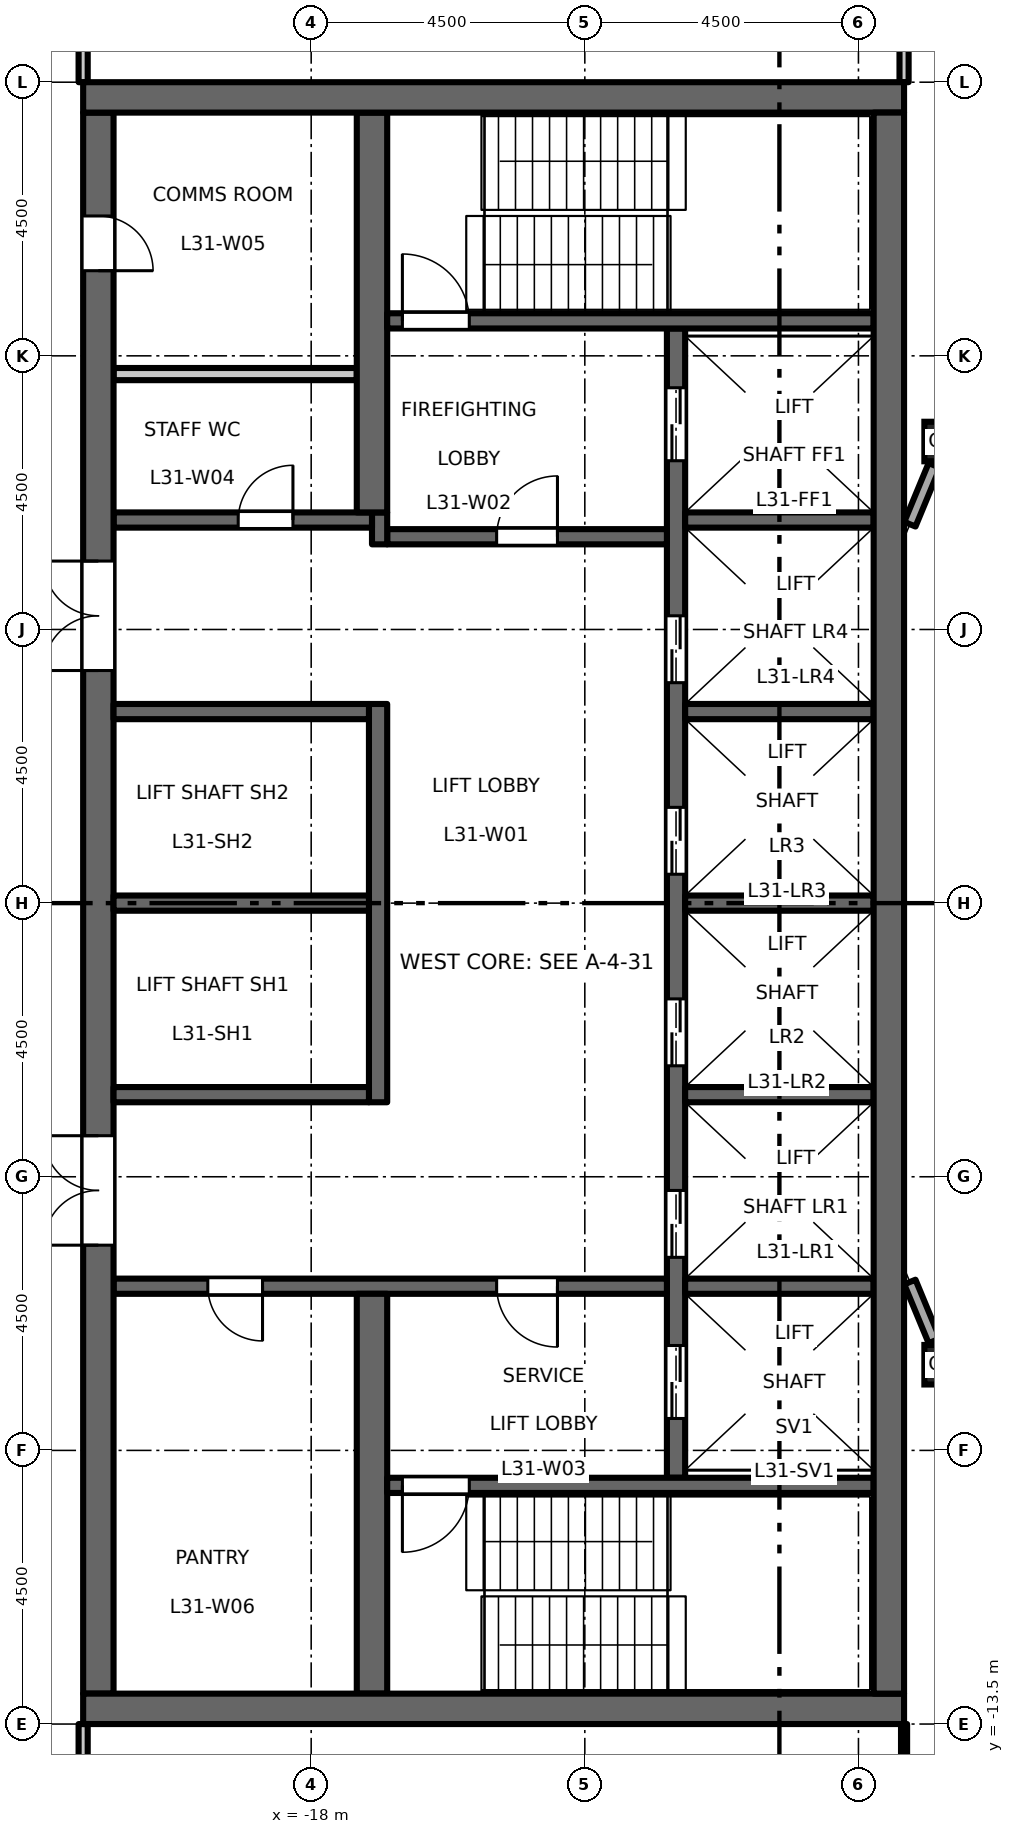
"""IFC4 building model, lengths in metres.
Left out: names, types, materials, properties, quantities, classifications, styles, units other than length and angle.
Written with IfcOpenShell. Run it as: python <this file> out.ifc"""

import sys

from ifc_helpers import new_model, si_unit, direction, frame, frame_2d, origin, origin_2d, place, context, subcontext, project, spatial, rectangle, hollow_rectangle, extrude, element, fill, save


model = new_model("IFC4")
c1 = context("Model", 3, precision=1e-05, world=origin(), true_north=direction((0.0, 1.0)))
c2 = subcontext(c1, "Body", "Model", "MODEL_VIEW")
j1 = project(units=[si_unit("LENGTHUNIT", "METRE"), si_unit("PLANEANGLEUNIT", "RADIAN")], contexts=[c1])
p1 = place(None, origin())
s1 = spatial("IfcSite", under=j1, at=p1, CompositionType="ELEMENT")
p2 = place(p1, origin())
s2 = spatial("IfcBuilding", under=s1, at=p2, CompositionType="ELEMENT")
p3 = place(p2, frame((0.0, 0.0, 145.2)))
s3 = spatial("IfcBuildingStorey", under=s2, at=p3, CompositionType="ELEMENT", Elevation=145.2)
for number, where, z_axis, x_axis in (
    (1, (-7.591, -7.591, 0.0), (0.0, 0.0, 1.0), (1.0, 0.0, 0.0)),
    (2, (-7.591, 7.591, 0.0), (0.0, 0.0, 1.0), (1.0, 0.0, 0.0)),
):
    element("IfcColumn", number, at=place(p3, frame(where, z_axis=z_axis, x_axis=x_axis)), inside=s3, PredefinedType="COLUMN", context=c2, shape_type="SweptSolid", body=[
        extrude(hollow_rectangle(XDim=0.65, YDim=0.65, WallThickness=0.036, at=origin_2d()), origin(), (0.0, 0.0, 1.0), 4.5),
    ])
p4 = place(p3, frame((-12.0, -9.45, 0.0), z_axis=(0.0, 0.0, 1.0), x_axis=(0.0, 1.0, 0.0)))
e3 = element("IfcWall", 3, at=p4, inside=s3, PredefinedType="SHEAR", context=c2, shape_type="SweptSolid", body=[
    extrude(rectangle(XDim=18.9, YDim=0.3, at=frame_2d((9.45, 0.0))), origin(), (0.0, 0.0, 1.0), 4.35),
])
p5 = place(p4, frame((3.625, 0.0, 0.0)))
e4 = element("IfcOpeningElement", 4, at=p5, cuts=e3, PredefinedType="OPENING", context=c2, shape_type="SweptSolid", body=[
    extrude(rectangle(XDim=1.1, YDim=2.1, at=frame_2d((0.55, 1.05))), frame((0.0, 0.16, 0.0), z_axis=(0.0, -1.0, 0.0), x_axis=(1.0, 0.0, 0.0)), (0.0, 0.0, 1.0), 0.32),
])
p6 = place(p4, frame((6.775, 0.0, 0.0)))
e5 = element("IfcOpeningElement", 5, at=p6, cuts=e3, PredefinedType="OPENING", context=c2, shape_type="SweptSolid", body=[
    extrude(rectangle(XDim=1.1, YDim=2.1, at=frame_2d((0.55, 1.05))), frame((0.0, 0.16, 0.0), z_axis=(0.0, -1.0, 0.0), x_axis=(1.0, 0.0, 0.0)), (0.0, 0.0, 1.0), 0.32),
])
p7 = place(p4, frame((9.925, 0.0, 0.0)))
e6 = element("IfcOpeningElement", 6, at=p7, cuts=e3, PredefinedType="OPENING", context=c2, shape_type="SweptSolid", body=[
    extrude(rectangle(XDim=1.1, YDim=2.1, at=frame_2d((0.55, 1.05))), frame((0.0, 0.16, 0.0), z_axis=(0.0, -1.0, 0.0), x_axis=(1.0, 0.0, 0.0)), (0.0, 0.0, 1.0), 0.32),
])
p8 = place(p4, frame((13.075, 0.0, 0.0)))
e7 = element("IfcOpeningElement", 7, at=p8, cuts=e3, PredefinedType="OPENING", context=c2, shape_type="SweptSolid", body=[
    extrude(rectangle(XDim=1.1, YDim=2.1, at=frame_2d((0.55, 1.05))), frame((0.0, 0.16, 0.0), z_axis=(0.0, -1.0, 0.0), x_axis=(1.0, 0.0, 0.0)), (0.0, 0.0, 1.0), 0.32),
])
p9 = place(p4, frame((16.725, 0.0, 0.0)))
e8 = element("IfcOpeningElement", 8, at=p9, cuts=e3, PredefinedType="OPENING", context=c2, shape_type="SweptSolid", body=[
    extrude(rectangle(XDim=1.2, YDim=2.1, at=frame_2d((0.6, 1.05))), frame((0.0, 0.16, 0.0), z_axis=(0.0, -1.0, 0.0), x_axis=(1.0, 0.0, 0.0)), (0.0, 0.0, 1.0), 0.32),
])
p10 = place(p4, frame((0.975, 0.0, 0.0)))
e9 = element("IfcOpeningElement", 9, at=p10, cuts=e3, PredefinedType="OPENING", context=c2, shape_type="SweptSolid", body=[
    extrude(rectangle(XDim=1.2, YDim=2.1, at=frame_2d((0.6, 1.05))), frame((0.0, 0.16, 0.0), z_axis=(0.0, -1.0, 0.0), x_axis=(1.0, 0.0, 0.0)), (0.0, 0.0, 1.0), 0.32),
])
p11 = place(p3, frame((-12.15, 6.025, 0.0), z_axis=(0.0, 0.0, 1.0), x_axis=(-1.0, 0.0, 0.0)))
e10 = element("IfcWall", 10, at=p11, inside=s3, PredefinedType="SHEAR", context=c2, shape_type="SweptSolid", body=[
    extrude(rectangle(XDim=4.6, YDim=0.25, at=frame_2d((2.3, 0.0))), origin(), (0.0, 0.0, 1.0), 4.35),
])
p12 = place(p11, frame((1.8, 0.0, 0.0)))
e11 = element("IfcOpeningElement", 11, at=p12, cuts=e10, PredefinedType="OPENING", context=c2, shape_type="SweptSolid", body=[
    extrude(rectangle(XDim=1.0, YDim=2.1, at=frame_2d((0.5, 1.05))), frame((0.0, 0.135, 0.0), z_axis=(0.0, -1.0, 0.0), x_axis=(1.0, 0.0, 0.0)), (0.0, 0.0, 1.0), 0.27),
])
p13 = place(p3, frame((-16.875, 5.9, 0.0), z_axis=(0.0, 0.0, 1.0), x_axis=(0.0, 1.0, 0.0)))
e12 = element("IfcWall", 12, at=p13, inside=s3, PredefinedType="SHEAR", context=c2, shape_type="SweptSolid", body=[
    extrude(rectangle(XDim=0.525, YDim=0.25, at=frame_2d((0.263, 0.0))), origin(), (0.0, 0.0, 1.0), 4.35),
])
p14 = place(p3, frame((-17.0, 6.3, 0.0), z_axis=(0.0, 0.0, 1.0), x_axis=(-1.0, 0.0, 0.0)))
e13 = element("IfcWall", 13, at=p14, inside=s3, PredefinedType="SHEAR", context=c2, shape_type="SweptSolid", body=[
    extrude(rectangle(XDim=4.25, YDim=0.25, at=frame_2d((2.125, 0.0))), origin(), (0.0, 0.0, 1.0), 4.35),
])
p15 = place(p14, frame((1.3, 0.0, 0.0)))
e14 = element("IfcOpeningElement", 14, at=p15, cuts=e13, PredefinedType="OPENING", context=c2, shape_type="SweptSolid", body=[
    extrude(rectangle(XDim=0.9, YDim=2.1, at=frame_2d((0.45, 1.05))), frame((0.0, 0.135, 0.0), z_axis=(0.0, -1.0, 0.0), x_axis=(1.0, 0.0, 0.0)), (0.0, 0.0, 1.0), 0.27),
])
p16 = place(p3, frame((-12.15, -6.3, 0.0), z_axis=(0.0, 0.0, 1.0), x_axis=(-1.0, 0.0, 0.0)))
e15 = element("IfcWall", 15, at=p16, inside=s3, PredefinedType="SHEAR", context=c2, shape_type="SweptSolid", body=[
    extrude(rectangle(XDim=9.1, YDim=0.25, at=frame_2d((4.55, 0.0))), origin(), (0.0, 0.0, 1.0), 4.35),
])
p17 = place(p16, frame((1.8, 0.0, 0.0)))
e16 = element("IfcOpeningElement", 16, at=p17, cuts=e15, PredefinedType="OPENING", context=c2, shape_type="SweptSolid", body=[
    extrude(rectangle(XDim=1.0, YDim=2.1, at=frame_2d((0.5, 1.05))), frame((0.0, 0.135, 0.0), z_axis=(0.0, -1.0, 0.0), x_axis=(1.0, 0.0, 0.0)), (0.0, 0.0, 1.0), 0.27),
])
p18 = place(p16, frame((6.65, 0.0, 0.0)))
e17 = element("IfcOpeningElement", 17, at=p18, cuts=e15, PredefinedType="OPENING", context=c2, shape_type="SweptSolid", body=[
    extrude(rectangle(XDim=0.9, YDim=2.1, at=frame_2d((0.45, 1.05))), frame((0.0, 0.135, 0.0), z_axis=(0.0, -1.0, 0.0), x_axis=(1.0, 0.0, 0.0)), (0.0, 0.0, 1.0), 0.27),
])
p19 = place(p3, frame((-21.5, -13.0, 0.0), z_axis=(0.0, 0.0, 1.0), x_axis=(0.0, 1.0, 0.0)))
e18 = element("IfcWall", 18, at=p19, inside=s3, PredefinedType="SHEAR", context=c2, shape_type="SweptSolid", body=[
    extrude(rectangle(XDim=26.0, YDim=0.5, at=frame_2d((13.0, 0.0))), origin(), (0.0, 0.0, 1.0), 4.35),
])
p20 = place(p19, frame((16.825, 0.0, 0.0)))
e19 = element("IfcOpeningElement", 19, at=p20, cuts=e18, PredefinedType="OPENING", context=c2, shape_type="SweptSolid", body=[
    extrude(rectangle(XDim=1.8, YDim=2.1, at=frame_2d((0.9, 1.05))), frame((0.0, 0.26, 0.0), z_axis=(0.0, -1.0, 0.0), x_axis=(1.0, 0.0, 0.0)), (0.0, 0.0, 1.0), 0.52),
])
p21 = place(p19, frame((7.375, 0.0, 0.0)))
e20 = element("IfcOpeningElement", 20, at=p21, cuts=e18, PredefinedType="OPENING", context=c2, shape_type="SweptSolid", body=[
    extrude(rectangle(XDim=1.8, YDim=2.1, at=frame_2d((0.9, 1.05))), frame((0.0, 0.26, 0.0), z_axis=(0.0, -1.0, 0.0), x_axis=(1.0, 0.0, 0.0)), (0.0, 0.0, 1.0), 0.52),
])
p22 = place(p19, frame((23.4, 0.0, 0.0)))
e21 = element("IfcOpeningElement", 21, at=p22, cuts=e18, PredefinedType="OPENING", context=c2, shape_type="SweptSolid", body=[
    extrude(rectangle(XDim=0.9, YDim=2.1, at=frame_2d((0.45, 1.05))), frame((0.0, 0.26, 0.0), z_axis=(0.0, -1.0, 0.0), x_axis=(1.0, 0.0, 0.0)), (0.0, 0.0, 1.0), 0.52),
])
p23 = place(p3, frame((-17.25, 8.7, 0.0), z_axis=(0.0, 0.0, 1.0), x_axis=(-1.0, 0.0, 0.0)))
e22 = element("IfcWall", 22, at=p23, inside=s3, PredefinedType="PARTITIONING", context=c2, shape_type="SweptSolid", body=[
    extrude(rectangle(XDim=4.0, YDim=0.2, at=frame_2d((2.0, 0.0))), origin(), (0.0, 0.0, 1.0), 4.35),
])
p24 = place(p3, frame((-16.9, -3.275, 0.0), z_axis=(0.0, 0.0, 1.0), x_axis=(0.0, 1.0, 0.0)))
e23 = element("IfcWall", 23, at=p24, inside=s3, PredefinedType="SHEAR", context=c2, shape_type="SweptSolid", body=[
    extrude(rectangle(XDim=6.55, YDim=0.3, at=frame_2d((3.275, 0.0))), origin(), (0.0, 0.0, 1.0), 4.35),
])
for number, where, z_axis, x_axis in (
    (24, (-17.05, 0.0, 0.0), (0.0, 0.0, 1.0), (-1.0, 0.0, 0.0)),
    (25, (-17.05, 3.15, 0.0), (0.0, 0.0, 1.0), (-1.0, 0.0, 0.0)),
    (26, (-17.05, -3.15, 0.0), (0.0, 0.0, 1.0), (-1.0, 0.0, 0.0)),
):
    element("IfcWall", number, at=place(p3, frame(where, z_axis=z_axis, x_axis=x_axis)), inside=s3, PredefinedType="SHEAR", context=c2, shape_type="SweptSolid", body=[
        extrude(rectangle(XDim=4.2, YDim=0.25, at=frame_2d((2.1, 0.0))), origin(), (0.0, 0.0, 1.0), 4.35),
    ])
for number, where, z_axis, x_axis in (
    (27, (-17.0, 6.425, 0.0), (0.0, 0.0, 1.0), (0.0, 1.0, 0.0)),
    (28, (-17.0, -13.0, 0.0), (0.0, 0.0, 1.0), (0.0, 1.0, 0.0)),
):
    element("IfcWall", number, at=place(p3, frame(where, z_axis=z_axis, x_axis=x_axis)), inside=s3, PredefinedType="SHEAR", context=c2, shape_type="SweptSolid", body=[
        extrude(rectangle(XDim=6.575, YDim=0.5, at=frame_2d((3.288, 0.0))), origin(), (0.0, 0.0, 1.0), 4.35),
    ])
for number, where, z_axis, x_axis in (
    (29, (-8.75, 0.0, 0.0), (0.0, 0.0, 1.0), (-1.0, 0.0, 0.0)),
    (30, (-8.75, 3.15, 0.0), (0.0, 0.0, 1.0), (-1.0, 0.0, 0.0)),
    (31, (-8.75, 6.3, 0.0), (0.0, 0.0, 1.0), (-1.0, 0.0, 0.0)),
    (32, (-8.75, -3.15, 0.0), (0.0, 0.0, 1.0), (-1.0, 0.0, 0.0)),
    (33, (-8.75, -6.3, 0.0), (0.0, 0.0, 1.0), (-1.0, 0.0, 0.0)),
):
    element("IfcWall", number, at=place(p3, frame(where, z_axis=z_axis, x_axis=x_axis)), inside=s3, PredefinedType="SHEAR", context=c2, shape_type="SweptSolid", body=[
        extrude(rectangle(XDim=3.1, YDim=0.25, at=frame_2d((1.55, 0.0))), origin(), (0.0, 0.0, 1.0), 4.35),
    ])
p25 = place(p3, frame((-8.75, 9.575, 0.0), z_axis=(0.0, 0.0, 1.0), x_axis=(-1.0, 0.0, 0.0)))
e34 = element("IfcWall", 34, at=p25, inside=s3, PredefinedType="SHEAR", context=c2, shape_type="SweptSolid", body=[
    extrude(rectangle(XDim=8.0, YDim=0.25, at=frame_2d((4.0, 0.0))), origin(), (0.0, 0.0, 1.0), 4.35),
])
p26 = place(p25, frame((6.65, 0.0, 0.0)))
e35 = element("IfcOpeningElement", 35, at=p26, cuts=e34, PredefinedType="OPENING", context=c2, shape_type="SweptSolid", body=[
    extrude(rectangle(XDim=1.1, YDim=2.1, at=frame_2d((0.55, 1.05))), frame((0.0, 0.135, 0.0), z_axis=(0.0, -1.0, 0.0), x_axis=(1.0, 0.0, 0.0)), (0.0, 0.0, 1.0), 0.27),
])
p27 = place(p3, frame((-8.75, -9.575, 0.0), z_axis=(0.0, 0.0, 1.0), x_axis=(-1.0, 0.0, 0.0)))
e36 = element("IfcWall", 36, at=p27, inside=s3, PredefinedType="SHEAR", context=c2, shape_type="SweptSolid", body=[
    extrude(rectangle(XDim=8.0, YDim=0.25, at=frame_2d((4.0, 0.0))), origin(), (0.0, 0.0, 1.0), 4.35),
])
p28 = place(p27, frame((6.65, 0.0, 0.0)))
e37 = element("IfcOpeningElement", 37, at=p28, cuts=e36, PredefinedType="OPENING", context=c2, shape_type="SweptSolid", body=[
    extrude(rectangle(XDim=1.1, YDim=2.1, at=frame_2d((0.55, 1.05))), frame((0.0, 0.135, 0.0), z_axis=(0.0, -1.0, 0.0), x_axis=(1.0, 0.0, 0.0)), (0.0, 0.0, 1.0), 0.27),
])
for number, where, z_axis, x_axis in (
    (38, (-8.25, 13.25, 0.0), (0.0, 0.0, 1.0), (-1.0, 0.0, 0.0)),
    (39, (-8.25, -13.25, 0.0), (0.0, 0.0, 1.0), (-1.0, 0.0, 0.0)),
):
    element("IfcWall", number, at=place(p3, frame(where, z_axis=z_axis, x_axis=x_axis)), inside=s3, PredefinedType="SHEAR", context=c2, shape_type="SweptSolid", body=[
        extrude(rectangle(XDim=13.5, YDim=0.5, at=frame_2d((6.75, 0.0))), origin(), (0.0, 0.0, 1.0), 4.35),
    ])
p29 = place(p3, frame((-8.5, -13.0, 0.0), z_axis=(0.0, 0.0, 1.0), x_axis=(0.0, 1.0, 0.0)))
e40 = element("IfcWall", 40, at=p29, inside=s3, PredefinedType="SHEAR", context=c2, shape_type="SweptSolid", body=[
    extrude(rectangle(XDim=26.0, YDim=0.5, at=frame_2d((13.0, 0.0))), origin(), (0.0, 0.0, 1.0), 4.35),
])
for number, where, z_axis, x_axis in (
    (41, (-7.753, 7.199, 0.0), (0.0, 0.0, 1.0), (-0.383, -0.924, 0.0)),
    (42, (-8.154, -6.231, 0.0), (0.0, 0.0, 1.0), (0.383, -0.924, 0.0)),
):
    element("IfcWall", number, at=place(p3, frame(where, z_axis=z_axis, x_axis=x_axis)), inside=s3, PredefinedType="STANDARD", context=c2, shape_type="SweptSolid", body=[
        extrude(rectangle(XDim=1.048, YDim=0.2, at=frame_2d((0.524, 0.0))), origin(), (0.0, 0.0, 1.0), 3.826),
    ])
for number, where, z_axis, x_axis in (
    (43, (-21.75, -16.925, 0.0), (0.0, 0.0, 1.0), (0.0, 1.0, 0.0)),
    (44, (-21.75, 13.5, 0.0), (0.0, 0.0, 1.0), (0.0, 1.0, 0.0)),
):
    element("IfcWall", number, at=place(p3, frame(where, z_axis=z_axis, x_axis=x_axis)), inside=s3, PredefinedType="PARTITIONING", context=c2, shape_type="SweptSolid", body=[
        extrude(rectangle(XDim=3.425, YDim=0.15, at=frame_2d((1.712, 0.0))), origin(), (0.0, 0.0, 1.0), 4.35),
    ])
p30 = place(p3, frame((-8.25, -16.925, 0.0), z_axis=(0.0, 0.0, 1.0), x_axis=(0.0, 1.0, 0.0)))
e45 = element("IfcWall", 45, at=p30, inside=s3, PredefinedType="PARTITIONING", context=c2, shape_type="SweptSolid", body=[
    extrude(rectangle(XDim=3.425, YDim=0.1, at=frame_2d((1.712, 0.0))), origin(), (0.0, 0.0, 1.0), 4.35),
])
p31 = place(p3, frame((-8.25, 13.5, 0.0), z_axis=(0.0, 0.0, 1.0), x_axis=(0.0, 1.0, 0.0)))
e46 = element("IfcWall", 46, at=p31, inside=s3, PredefinedType="PARTITIONING", context=c2, shape_type="SweptSolid", body=[
    extrude(rectangle(XDim=3.425, YDim=0.15, at=frame_2d((1.712, 0.0))), origin(), (0.0, 0.0, 1.0), 4.35),
])
p32 = place(p12, origin())
e47 = element("IfcDoor", 47, at=p32, inside=s3, OperationType="SINGLE_SWING_LEFT", PredefinedType="DOOR", context=c2, shape_type="SweptSolid", body=[
    extrude(rectangle(XDim=1.0, YDim=2.1, at=frame_2d((0.5, 1.05))), frame((0.0, 0.025, 0.0), z_axis=(0.0, -1.0, 0.0), x_axis=(1.0, 0.0, 0.0)), (0.0, 0.0, 1.0), 0.05),
])
fill(e11, e47)
p33 = place(p17, origin())
e48 = element("IfcDoor", 48, at=p33, inside=s3, OperationType="SINGLE_SWING_RIGHT", PredefinedType="DOOR", context=c2, shape_type="SweptSolid", body=[
    extrude(rectangle(XDim=1.0, YDim=2.1, at=frame_2d((0.5, 1.05))), frame((0.0, 0.025, 0.0), z_axis=(0.0, -1.0, 0.0), x_axis=(1.0, 0.0, 0.0)), (0.0, 0.0, 1.0), 0.05),
])
fill(e16, e48)
p34 = place(p26, origin())
e49 = element("IfcDoor", 49, at=p34, inside=s3, OperationType="SINGLE_SWING_RIGHT", PredefinedType="DOOR", context=c2, shape_type="SweptSolid", body=[
    extrude(rectangle(XDim=1.1, YDim=2.1, at=frame_2d((0.55, 1.05))), frame((0.0, 0.025, 0.0), z_axis=(0.0, -1.0, 0.0), x_axis=(1.0, 0.0, 0.0)), (0.0, 0.0, 1.0), 0.05),
])
fill(e35, e49)
p35 = place(p28, origin())
e50 = element("IfcDoor", 50, at=p35, inside=s3, OperationType="SINGLE_SWING_LEFT", PredefinedType="DOOR", context=c2, shape_type="SweptSolid", body=[
    extrude(rectangle(XDim=1.1, YDim=2.1, at=frame_2d((0.55, 1.05))), frame((0.0, 0.025, 0.0), z_axis=(0.0, -1.0, 0.0), x_axis=(1.0, 0.0, 0.0)), (0.0, 0.0, 1.0), 0.05),
])
fill(e37, e50)
p36 = place(p20, origin())
e51 = element("IfcDoor", 51, at=p36, inside=s3, OperationType="DOUBLE_DOOR_DOUBLE_SWING", PredefinedType="DOOR", context=c2, shape_type="SweptSolid", body=[
    extrude(rectangle(XDim=1.8, YDim=2.1, at=frame_2d((0.9, 1.05))), frame((0.0, 0.025, 0.0), z_axis=(0.0, -1.0, 0.0), x_axis=(1.0, 0.0, 0.0)), (0.0, 0.0, 1.0), 0.05),
])
fill(e19, e51)
p37 = place(p21, origin())
e52 = element("IfcDoor", 52, at=p37, inside=s3, OperationType="DOUBLE_DOOR_DOUBLE_SWING", PredefinedType="DOOR", context=c2, shape_type="SweptSolid", body=[
    extrude(rectangle(XDim=1.8, YDim=2.1, at=frame_2d((0.9, 1.05))), frame((0.0, 0.025, 0.0), z_axis=(0.0, -1.0, 0.0), x_axis=(1.0, 0.0, 0.0)), (0.0, 0.0, 1.0), 0.05),
])
fill(e20, e52)
p38 = place(p5, origin())
e53 = element("IfcDoor", 53, at=p38, inside=s3, OperationType="DOUBLE_DOOR_SLIDING", PredefinedType="DOOR", context=c2, shape_type="SweptSolid", body=[
    extrude(rectangle(XDim=1.1, YDim=2.1, at=frame_2d((0.55, 1.05))), frame((0.0, 0.025, 0.0), z_axis=(0.0, -1.0, 0.0), x_axis=(1.0, 0.0, 0.0)), (0.0, 0.0, 1.0), 0.05),
])
fill(e4, e53)
p39 = place(p6, origin())
e54 = element("IfcDoor", 54, at=p39, inside=s3, OperationType="DOUBLE_DOOR_SLIDING", PredefinedType="DOOR", context=c2, shape_type="SweptSolid", body=[
    extrude(rectangle(XDim=1.1, YDim=2.1, at=frame_2d((0.55, 1.05))), frame((0.0, 0.025, 0.0), z_axis=(0.0, -1.0, 0.0), x_axis=(1.0, 0.0, 0.0)), (0.0, 0.0, 1.0), 0.05),
])
fill(e5, e54)
p40 = place(p7, origin())
e55 = element("IfcDoor", 55, at=p40, inside=s3, OperationType="DOUBLE_DOOR_SLIDING", PredefinedType="DOOR", context=c2, shape_type="SweptSolid", body=[
    extrude(rectangle(XDim=1.1, YDim=2.1, at=frame_2d((0.55, 1.05))), frame((0.0, 0.025, 0.0), z_axis=(0.0, -1.0, 0.0), x_axis=(1.0, 0.0, 0.0)), (0.0, 0.0, 1.0), 0.05),
])
fill(e6, e55)
p41 = place(p8, origin())
e56 = element("IfcDoor", 56, at=p41, inside=s3, OperationType="DOUBLE_DOOR_SLIDING", PredefinedType="DOOR", context=c2, shape_type="SweptSolid", body=[
    extrude(rectangle(XDim=1.1, YDim=2.1, at=frame_2d((0.55, 1.05))), frame((0.0, 0.025, 0.0), z_axis=(0.0, -1.0, 0.0), x_axis=(1.0, 0.0, 0.0)), (0.0, 0.0, 1.0), 0.05),
])
fill(e7, e56)
p42 = place(p9, origin())
e57 = element("IfcDoor", 57, at=p42, inside=s3, OperationType="DOUBLE_DOOR_SLIDING", PredefinedType="DOOR", context=c2, shape_type="SweptSolid", body=[
    extrude(rectangle(XDim=1.2, YDim=2.1, at=frame_2d((0.6, 1.05))), frame((0.0, 0.025, 0.0), z_axis=(0.0, -1.0, 0.0), x_axis=(1.0, 0.0, 0.0)), (0.0, 0.0, 1.0), 0.05),
])
fill(e8, e57)
p43 = place(p10, origin())
e58 = element("IfcDoor", 58, at=p43, inside=s3, OperationType="DOUBLE_DOOR_SLIDING", PredefinedType="DOOR", context=c2, shape_type="SweptSolid", body=[
    extrude(rectangle(XDim=1.2, YDim=2.1, at=frame_2d((0.6, 1.05))), frame((0.0, 0.025, 0.0), z_axis=(0.0, -1.0, 0.0), x_axis=(1.0, 0.0, 0.0)), (0.0, 0.0, 1.0), 0.05),
])
fill(e9, e58)
p44 = place(p15, origin())
e59 = element("IfcDoor", 59, at=p44, inside=s3, OperationType="SINGLE_SWING_LEFT", PredefinedType="DOOR", context=c2, shape_type="SweptSolid", body=[
    extrude(rectangle(XDim=0.9, YDim=2.1, at=frame_2d((0.45, 1.05))), frame((0.0, 0.025, 0.0), z_axis=(0.0, -1.0, 0.0), x_axis=(1.0, 0.0, 0.0)), (0.0, 0.0, 1.0), 0.05),
])
fill(e14, e59)
p45 = place(p22, origin())
e60 = element("IfcDoor", 60, at=p45, inside=s3, OperationType="SINGLE_SWING_LEFT", PredefinedType="DOOR", context=c2, shape_type="SweptSolid", body=[
    extrude(rectangle(XDim=0.9, YDim=2.1, at=frame_2d((0.45, 1.05))), frame((0.0, 0.025, 0.0), z_axis=(0.0, -1.0, 0.0), x_axis=(1.0, 0.0, 0.0)), (0.0, 0.0, 1.0), 0.05),
])
fill(e21, e60)
p46 = place(p18, origin())
e61 = element("IfcDoor", 61, at=p46, inside=s3, OperationType="SINGLE_SWING_RIGHT", PredefinedType="DOOR", context=c2, shape_type="SweptSolid", body=[
    extrude(rectangle(XDim=0.9, YDim=2.1, at=frame_2d((0.45, 1.05))), frame((0.0, 0.025, 0.0), z_axis=(0.0, -1.0, 0.0), x_axis=(1.0, 0.0, 0.0)), (0.0, 0.0, 1.0), 0.05),
])
fill(e17, e61)
save(model, sys.argv[1])
